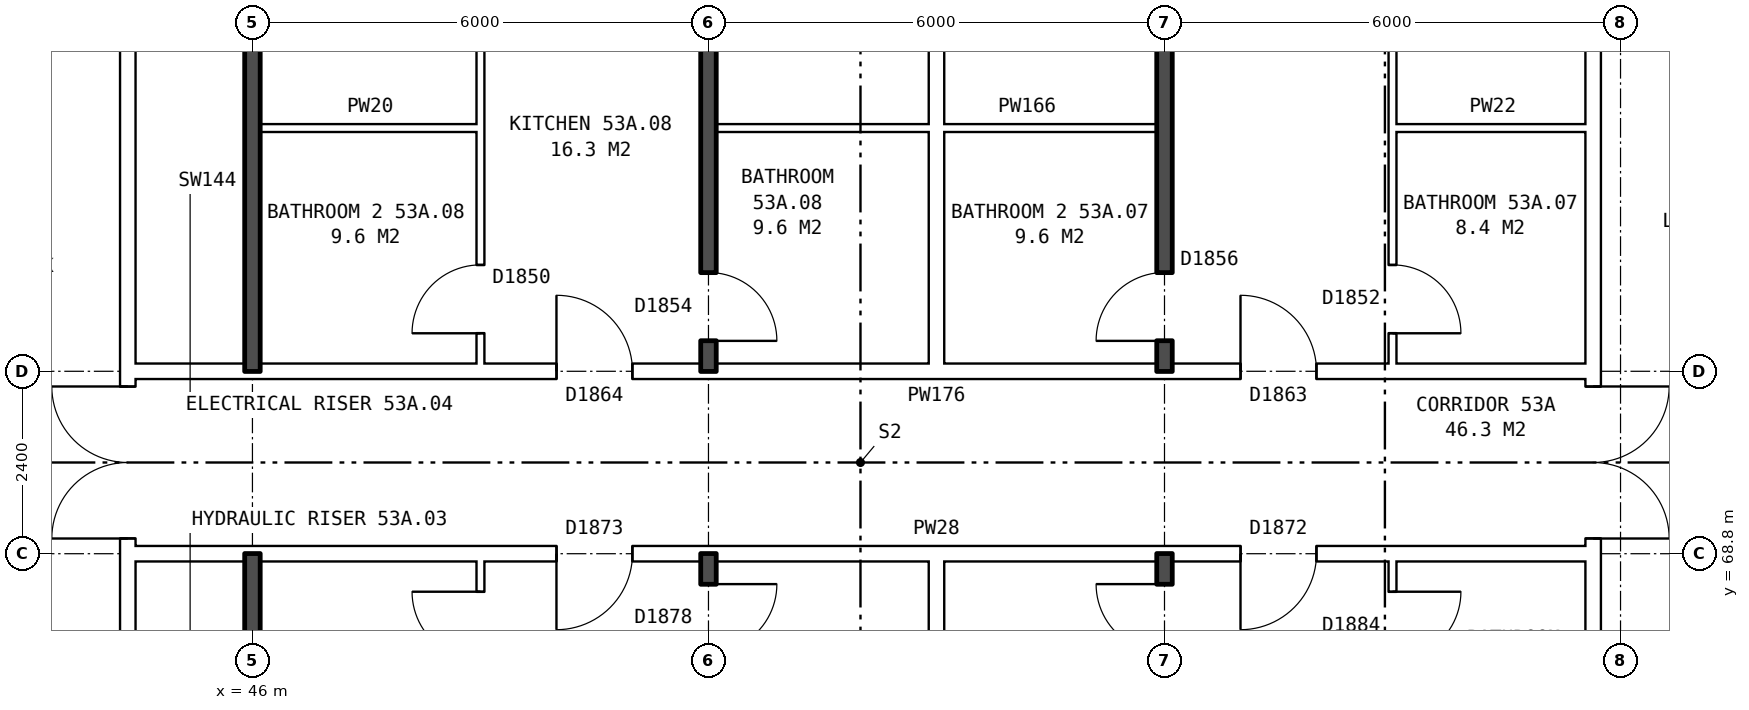
"""IFC4 building model, lengths in metres.
Left out: names, types, materials, properties, quantities, classifications, styles, units other than length and angle.
Written with IfcOpenShell. Run it as: python <this file> out.ifc"""

import sys

from ifc_helpers import new_model, si_unit, direction, frame, frame_2d, origin, place, context, subcontext, project, spatial, rectangle, extrude, element, fill, save


model = new_model("IFC4")
c1 = context("Model", 3, precision=1e-05, world=origin(), true_north=direction((0.0, 1.0)))
c2 = subcontext(c1, "Body", "Model", "MODEL_VIEW")
j1 = project(units=[si_unit("LENGTHUNIT", "METRE"), si_unit("PLANEANGLEUNIT", "RADIAN")], contexts=[c1])
p1 = place(None, origin())
s1 = spatial("IfcSite", under=j1, at=p1, CompositionType="ELEMENT")
p2 = place(p1, origin())
s2 = spatial("IfcBuilding", under=s1, at=p2, CompositionType="ELEMENT")
p3 = place(p2, frame((0.0, 0.0, 188.2)))
s3 = spatial("IfcBuildingStorey", under=s2, at=p3, CompositionType="ELEMENT", Elevation=188.2)
p4 = place(p3, frame((63.64, 63.9, 0.0), z_axis=(0.0, 0.0, 1.0), x_axis=(0.0, 1.0, 0.0)))
e1 = element("IfcWall", 1, at=p4, inside=s3, PredefinedType="PARTITIONING", context=c2, shape_type="SweptSolid", body=[
    extrude(rectangle(XDim=12.2, YDim=0.2, at=frame_2d((6.1, 0.0))), origin(), (0.0, 0.0, 1.0), 2.85),
])
p5 = place(p4, frame((5.1, 0.0, 0.0)))
e2 = element("IfcOpeningElement", 2, at=p5, cuts=e1, PredefinedType="OPENING", context=c2, shape_type="SweptSolid", body=[
    extrude(rectangle(XDim=2.0, YDim=2.1, at=frame_2d((1.0, 1.05))), frame((0.0, 0.11, 0.0), z_axis=(0.0, -1.0, 0.0), x_axis=(1.0, 0.0, 0.0)), (0.0, 0.0, 1.0), 0.22),
])
p6 = place(p3, frame((44.36, 63.9, 0.0), z_axis=(0.0, 0.0, 1.0), x_axis=(0.0, 1.0, 0.0)))
e3 = element("IfcWall", 3, at=p6, inside=s3, PredefinedType="PARTITIONING", context=c2, shape_type="SweptSolid", body=[
    extrude(rectangle(XDim=12.2, YDim=0.2, at=frame_2d((6.1, 0.0))), origin(), (0.0, 0.0, 1.0), 2.85),
])
p7 = place(p6, frame((5.1, 0.0, 0.0)))
e4 = element("IfcOpeningElement", 4, at=p7, cuts=e3, PredefinedType="OPENING", context=c2, shape_type="SweptSolid", body=[
    extrude(rectangle(XDim=2.0, YDim=2.1, at=frame_2d((1.0, 1.05))), frame((0.0, 0.11, 0.0), z_axis=(0.0, -1.0, 0.0), x_axis=(1.0, 0.0, 0.0)), (0.0, 0.0, 1.0), 0.22),
])
p8 = place(p3, frame((44.36, 68.8, 0.0), z_axis=(0.0, 0.0, 1.0), x_axis=(1.0, 0.0, 0.0)))
e5 = element("IfcWall", 5, at=p8, inside=s3, PredefinedType="PARTITIONING", context=c2, shape_type="SweptSolid", body=[
    extrude(rectangle(XDim=19.28, YDim=0.2, at=frame_2d((9.64, 0.0))), origin(), (0.0, 0.0, 1.0), 2.85),
])
p9 = place(p8, frame((14.64, 0.0, 0.0)))
e6 = element("IfcOpeningElement", 6, at=p9, cuts=e5, PredefinedType="OPENING", context=c2, shape_type="SweptSolid", body=[
    extrude(rectangle(XDim=1.0, YDim=2.1, at=frame_2d((0.5, 1.05))), frame((0.0, 0.11, 0.0), z_axis=(0.0, -1.0, 0.0), x_axis=(1.0, 0.0, 0.0)), (0.0, 0.0, 1.0), 0.22),
])
p10 = place(p8, frame((5.64, 0.0, 0.0)))
e7 = element("IfcOpeningElement", 7, at=p10, cuts=e5, PredefinedType="OPENING", context=c2, shape_type="SweptSolid", body=[
    extrude(rectangle(XDim=1.0, YDim=2.1, at=frame_2d((0.5, 1.05))), frame((0.0, 0.11, 0.0), z_axis=(0.0, -1.0, 0.0), x_axis=(1.0, 0.0, 0.0)), (0.0, 0.0, 1.0), 0.22),
])
p11 = place(p3, frame((44.36, 71.2, 0.0), z_axis=(0.0, 0.0, 1.0), x_axis=(1.0, 0.0, 0.0)))
e8 = element("IfcWall", 8, at=p11, inside=s3, PredefinedType="PARTITIONING", context=c2, shape_type="SweptSolid", body=[
    extrude(rectangle(XDim=19.28, YDim=0.2, at=frame_2d((9.64, 0.0))), origin(), (0.0, 0.0, 1.0), 2.85),
])
p12 = place(p11, frame((14.64, 0.0, 0.0)))
e9 = element("IfcOpeningElement", 9, at=p12, cuts=e8, PredefinedType="OPENING", context=c2, shape_type="SweptSolid", body=[
    extrude(rectangle(XDim=1.0, YDim=2.1, at=frame_2d((0.5, 1.05))), frame((0.0, 0.11, 0.0), z_axis=(0.0, -1.0, 0.0), x_axis=(1.0, 0.0, 0.0)), (0.0, 0.0, 1.0), 0.22),
])
p13 = place(p11, frame((5.64, 0.0, 0.0)))
e10 = element("IfcOpeningElement", 10, at=p13, cuts=e8, PredefinedType="OPENING", context=c2, shape_type="SweptSolid", body=[
    extrude(rectangle(XDim=1.0, YDim=2.1, at=frame_2d((0.5, 1.05))), frame((0.0, 0.11, 0.0), z_axis=(0.0, -1.0, 0.0), x_axis=(1.0, 0.0, 0.0)), (0.0, 0.0, 1.0), 0.22),
])
p14 = place(p3, frame((46.1, 74.4, 0.0), z_axis=(0.0, 0.0, 1.0), x_axis=(1.0, 0.0, 0.0)))
e11 = element("IfcWall", 11, at=p14, inside=s3, PredefinedType="PARTITIONING", context=c2, shape_type="SweptSolid", body=[
    extrude(rectangle(XDim=2.9, YDim=0.1, at=frame_2d((1.45, 0.0))), origin(), (0.0, 0.0, 1.0), 2.85),
])
p15 = place(p3, frame((52.1, 74.4, 0.0), z_axis=(0.0, 0.0, 1.0), x_axis=(1.0, 0.0, 0.0)))
e12 = element("IfcWall", 12, at=p15, inside=s3, PredefinedType="PARTITIONING", context=c2, shape_type="SweptSolid", body=[
    extrude(rectangle(XDim=5.8, YDim=0.1, at=frame_2d((2.9, 0.0))), origin(), (0.0, 0.0, 1.0), 2.85),
])
p16 = place(p3, frame((61.0, 74.4, 0.0), z_axis=(0.0, 0.0, 1.0), x_axis=(1.0, 0.0, 0.0)))
e13 = element("IfcWall", 13, at=p16, inside=s3, PredefinedType="PARTITIONING", context=c2, shape_type="SweptSolid", body=[
    extrude(rectangle(XDim=2.64, YDim=0.1, at=frame_2d((1.32, 0.0))), origin(), (0.0, 0.0, 1.0), 2.85),
])
for number, where, z_axis, x_axis in (
    (14, (46.0, 63.8, 0.0), (0.0, 0.0, 1.0), (0.0, 1.0, 0.0)),
    (15, (46.0, 71.2, 0.0), (0.0, 0.0, 1.0), (0.0, 1.0, 0.0)),
):
    element("IfcWall", number, at=place(p3, frame(where, z_axis=z_axis, x_axis=x_axis)), inside=s3, PredefinedType="SOLIDWALL", context=c2, shape_type="SweptSolid", body=[
        extrude(rectangle(XDim=5.0, YDim=0.2, at=frame_2d((2.5, 0.0))), origin(), (0.0, 0.0, 1.0), 2.85),
    ])
p17 = place(p3, frame((49.0, 54.36, 0.0), z_axis=(0.0, 0.0, 1.0), x_axis=(0.0, 1.0, 0.0)))
e16 = element("IfcWall", 16, at=p17, inside=s3, PredefinedType="PARTITIONING", context=c2, shape_type="SweptSolid", body=[
    extrude(rectangle(XDim=14.34, YDim=0.1, at=frame_2d((7.17, 0.0))), origin(), (0.0, 0.0, 1.0), 2.85),
])
p18 = place(p17, frame((5.5, 0.0, 0.0)))
e17 = element("IfcOpeningElement", 17, at=p18, cuts=e16, PredefinedType="OPENING", context=c2, shape_type="SweptSolid", body=[
    extrude(rectangle(XDim=0.9, YDim=2.1, at=frame_2d((0.45, 1.05))), frame((0.0, 0.06, 0.0), z_axis=(0.0, -1.0, 0.0), x_axis=(1.0, 0.0, 0.0)), (0.0, 0.0, 1.0), 0.12),
])
p19 = place(p17, frame((13.04, 0.0, 0.0)))
e18 = element("IfcOpeningElement", 18, at=p19, cuts=e16, PredefinedType="OPENING", context=c2, shape_type="SweptSolid", body=[
    extrude(rectangle(XDim=0.9, YDim=2.1, at=frame_2d((0.45, 1.05))), frame((0.0, 0.06, 0.0), z_axis=(0.0, -1.0, 0.0), x_axis=(1.0, 0.0, 0.0)), (0.0, 0.0, 1.0), 0.12),
])
p20 = place(p3, frame((49.0, 71.3, 0.0), z_axis=(0.0, 0.0, 1.0), x_axis=(0.0, 1.0, 0.0)))
e19 = element("IfcWall", 19, at=p20, inside=s3, PredefinedType="PARTITIONING", context=c2, shape_type="SweptSolid", body=[
    extrude(rectangle(XDim=14.34, YDim=0.1, at=frame_2d((7.17, 0.0))), origin(), (0.0, 0.0, 1.0), 2.85),
])
p21 = place(p20, frame((5.74, 0.0, 0.0)))
e20 = element("IfcOpeningElement", 20, at=p21, cuts=e19, PredefinedType="OPENING", context=c2, shape_type="SweptSolid", body=[
    extrude(rectangle(XDim=0.9, YDim=2.1, at=frame_2d((0.45, 1.05))), frame((0.0, 0.06, 0.0), z_axis=(0.0, -1.0, 0.0), x_axis=(1.0, 0.0, 0.0)), (0.0, 0.0, 1.0), 0.12),
])
p22 = place(p20, frame((0.4, 0.0, 0.0)))
e21 = element("IfcOpeningElement", 21, at=p22, cuts=e19, PredefinedType="OPENING", context=c2, shape_type="SweptSolid", body=[
    extrude(rectangle(XDim=0.9, YDim=2.1, at=frame_2d((0.45, 1.05))), frame((0.0, 0.06, 0.0), z_axis=(0.0, -1.0, 0.0), x_axis=(1.0, 0.0, 0.0)), (0.0, 0.0, 1.0), 0.12),
])
p23 = place(p3, frame((52.0, 54.36, 0.0), z_axis=(0.0, 0.0, 1.0), x_axis=(0.0, 1.0, 0.0)))
e22 = element("IfcWall", 22, at=p23, inside=s3, PredefinedType="SOLIDWALL", context=c2, shape_type="SweptSolid", body=[
    extrude(rectangle(XDim=14.44, YDim=0.2, at=frame_2d((7.22, 0.0))), origin(), (0.0, 0.0, 1.0), 2.85),
])
p24 = place(p23, frame((5.5, 0.0, 0.0)))
e23 = element("IfcOpeningElement", 23, at=p24, cuts=e22, PredefinedType="OPENING", context=c2, shape_type="SweptSolid", body=[
    extrude(rectangle(XDim=0.9, YDim=2.1, at=frame_2d((0.45, 1.05))), frame((0.0, 0.11, 0.0), z_axis=(0.0, -1.0, 0.0), x_axis=(1.0, 0.0, 0.0)), (0.0, 0.0, 1.0), 0.22),
])
p25 = place(p23, frame((13.14, 0.0, 0.0)))
e24 = element("IfcOpeningElement", 24, at=p25, cuts=e22, PredefinedType="OPENING", context=c2, shape_type="SweptSolid", body=[
    extrude(rectangle(XDim=0.9, YDim=2.1, at=frame_2d((0.45, 1.05))), frame((0.0, 0.11, 0.0), z_axis=(0.0, -1.0, 0.0), x_axis=(1.0, 0.0, 0.0)), (0.0, 0.0, 1.0), 0.22),
])
p26 = place(p3, frame((52.0, 71.2, 0.0), z_axis=(0.0, 0.0, 1.0), x_axis=(0.0, 1.0, 0.0)))
e25 = element("IfcWall", 25, at=p26, inside=s3, PredefinedType="SOLIDWALL", context=c2, shape_type="SweptSolid", body=[
    extrude(rectangle(XDim=14.44, YDim=0.2, at=frame_2d((7.22, 0.0))), origin(), (0.0, 0.0, 1.0), 2.85),
])
p27 = place(p26, frame((5.84, 0.0, 0.0)))
e26 = element("IfcOpeningElement", 26, at=p27, cuts=e25, PredefinedType="OPENING", context=c2, shape_type="SweptSolid", body=[
    extrude(rectangle(XDim=0.9, YDim=2.1, at=frame_2d((0.45, 1.05))), frame((0.0, 0.11, 0.0), z_axis=(0.0, -1.0, 0.0), x_axis=(1.0, 0.0, 0.0)), (0.0, 0.0, 1.0), 0.22),
])
p28 = place(p26, frame((0.4, 0.0, 0.0)))
e27 = element("IfcOpeningElement", 27, at=p28, cuts=e25, PredefinedType="OPENING", context=c2, shape_type="SweptSolid", body=[
    extrude(rectangle(XDim=0.9, YDim=2.1, at=frame_2d((0.45, 1.05))), frame((0.0, 0.11, 0.0), z_axis=(0.0, -1.0, 0.0), x_axis=(1.0, 0.0, 0.0)), (0.0, 0.0, 1.0), 0.22),
])
for number, where, z_axis, x_axis in (
    (28, (55.0, 54.36, 0.0), (0.0, 0.0, 1.0), (0.0, 1.0, 0.0)),
    (29, (55.0, 71.3, 0.0), (0.0, 0.0, 1.0), (0.0, 1.0, 0.0)),
):
    element("IfcWall", number, at=place(p3, frame(where, z_axis=z_axis, x_axis=x_axis)), inside=s3, PredefinedType="PARTITIONING", context=c2, shape_type="SweptSolid", body=[
        extrude(rectangle(XDim=14.34, YDim=0.2, at=frame_2d((7.17, 0.0))), origin(), (0.0, 0.0, 1.0), 2.85),
    ])
p29 = place(p3, frame((58.0, 54.36, 0.0), z_axis=(0.0, 0.0, 1.0), x_axis=(0.0, 1.0, 0.0)))
e30 = element("IfcWall", 30, at=p29, inside=s3, PredefinedType="SOLIDWALL", context=c2, shape_type="SweptSolid", body=[
    extrude(rectangle(XDim=14.44, YDim=0.2, at=frame_2d((7.22, 0.0))), origin(), (0.0, 0.0, 1.0), 2.85),
])
p30 = place(p29, frame((5.5, 0.0, 0.0)))
e31 = element("IfcOpeningElement", 31, at=p30, cuts=e30, PredefinedType="OPENING", context=c2, shape_type="SweptSolid", body=[
    extrude(rectangle(XDim=0.9, YDim=2.1, at=frame_2d((0.45, 1.05))), frame((0.0, 0.11, 0.0), z_axis=(0.0, -1.0, 0.0), x_axis=(1.0, 0.0, 0.0)), (0.0, 0.0, 1.0), 0.22),
])
p31 = place(p29, frame((13.14, 0.0, 0.0)))
e32 = element("IfcOpeningElement", 32, at=p31, cuts=e30, PredefinedType="OPENING", context=c2, shape_type="SweptSolid", body=[
    extrude(rectangle(XDim=0.9, YDim=2.1, at=frame_2d((0.45, 1.05))), frame((0.0, 0.11, 0.0), z_axis=(0.0, -1.0, 0.0), x_axis=(1.0, 0.0, 0.0)), (0.0, 0.0, 1.0), 0.22),
])
p32 = place(p3, frame((58.0, 71.2, 0.0), z_axis=(0.0, 0.0, 1.0), x_axis=(0.0, 1.0, 0.0)))
e33 = element("IfcWall", 33, at=p32, inside=s3, PredefinedType="SOLIDWALL", context=c2, shape_type="SweptSolid", body=[
    extrude(rectangle(XDim=14.44, YDim=0.2, at=frame_2d((7.22, 0.0))), origin(), (0.0, 0.0, 1.0), 2.85),
])
p33 = place(p32, frame((9.34, 0.0, 0.0)))
e34 = element("IfcOpeningElement", 34, at=p33, cuts=e33, PredefinedType="OPENING", context=c2, shape_type="SweptSolid", body=[
    extrude(rectangle(XDim=0.9, YDim=2.1, at=frame_2d((0.45, 1.05))), frame((0.0, 0.11, 0.0), z_axis=(0.0, -1.0, 0.0), x_axis=(1.0, 0.0, 0.0)), (0.0, 0.0, 1.0), 0.22),
])
p34 = place(p32, frame((0.4, 0.0, 0.0)))
e35 = element("IfcOpeningElement", 35, at=p34, cuts=e33, PredefinedType="OPENING", context=c2, shape_type="SweptSolid", body=[
    extrude(rectangle(XDim=0.9, YDim=2.1, at=frame_2d((0.45, 1.05))), frame((0.0, 0.11, 0.0), z_axis=(0.0, -1.0, 0.0), x_axis=(1.0, 0.0, 0.0)), (0.0, 0.0, 1.0), 0.22),
])
p35 = place(p3, frame((61.0, 54.36, 0.0), z_axis=(0.0, 0.0, 1.0), x_axis=(0.0, 1.0, 0.0)))
e36 = element("IfcWall", 36, at=p35, inside=s3, PredefinedType="PARTITIONING", context=c2, shape_type="SweptSolid", body=[
    extrude(rectangle(XDim=14.34, YDim=0.1, at=frame_2d((7.17, 0.0))), origin(), (0.0, 0.0, 1.0), 2.85),
])
p36 = place(p35, frame((5.5, 0.0, 0.0)))
e37 = element("IfcOpeningElement", 37, at=p36, cuts=e36, PredefinedType="OPENING", context=c2, shape_type="SweptSolid", body=[
    extrude(rectangle(XDim=0.9, YDim=2.1, at=frame_2d((0.45, 1.05))), frame((0.0, 0.06, 0.0), z_axis=(0.0, -1.0, 0.0), x_axis=(1.0, 0.0, 0.0)), (0.0, 0.0, 1.0), 0.12),
])
p37 = place(p35, frame((13.04, 0.0, 0.0)))
e38 = element("IfcOpeningElement", 38, at=p37, cuts=e36, PredefinedType="OPENING", context=c2, shape_type="SweptSolid", body=[
    extrude(rectangle(XDim=0.9, YDim=2.1, at=frame_2d((0.45, 1.05))), frame((0.0, 0.06, 0.0), z_axis=(0.0, -1.0, 0.0), x_axis=(1.0, 0.0, 0.0)), (0.0, 0.0, 1.0), 0.12),
])
p38 = place(p3, frame((61.0, 71.3, 0.0), z_axis=(0.0, 0.0, 1.0), x_axis=(0.0, 1.0, 0.0)))
e39 = element("IfcWall", 39, at=p38, inside=s3, PredefinedType="PARTITIONING", context=c2, shape_type="SweptSolid", body=[
    extrude(rectangle(XDim=14.34, YDim=0.1, at=frame_2d((7.17, 0.0))), origin(), (0.0, 0.0, 1.0), 2.85),
])
p39 = place(p38, frame((9.24, 0.0, 0.0)))
e40 = element("IfcOpeningElement", 40, at=p39, cuts=e39, PredefinedType="OPENING", context=c2, shape_type="SweptSolid", body=[
    extrude(rectangle(XDim=0.9, YDim=2.1, at=frame_2d((0.45, 1.05))), frame((0.0, 0.06, 0.0), z_axis=(0.0, -1.0, 0.0), x_axis=(1.0, 0.0, 0.0)), (0.0, 0.0, 1.0), 0.12),
])
p40 = place(p38, frame((0.4, 0.0, 0.0)))
e41 = element("IfcOpeningElement", 41, at=p40, cuts=e39, PredefinedType="OPENING", context=c2, shape_type="SweptSolid", body=[
    extrude(rectangle(XDim=0.9, YDim=2.1, at=frame_2d((0.45, 1.05))), frame((0.0, 0.06, 0.0), z_axis=(0.0, -1.0, 0.0), x_axis=(1.0, 0.0, 0.0)), (0.0, 0.0, 1.0), 0.12),
])
p41 = place(p5, frame((2.0, 0.0, 0.0), z_axis=(0.0, 0.0, 1.0), x_axis=(-1.0, 0.0, 0.0)))
e42 = element("IfcDoor", 42, at=p41, inside=s3, OperationType="DOUBLE_DOOR_SINGLE_SWING", PredefinedType="DOOR", context=c2, shape_type="SweptSolid", body=[
    extrude(rectangle(XDim=2.0, YDim=2.1, at=frame_2d((1.0, 1.05))), frame((0.0, 0.025, 0.0), z_axis=(0.0, -1.0, 0.0), x_axis=(1.0, 0.0, 0.0)), (0.0, 0.0, 1.0), 0.05),
])
fill(e2, e42)
p42 = place(p7, origin())
e43 = element("IfcDoor", 43, at=p42, inside=s3, OperationType="DOUBLE_DOOR_SINGLE_SWING", PredefinedType="DOOR", context=c2, shape_type="SweptSolid", body=[
    extrude(rectangle(XDim=2.0, YDim=2.1, at=frame_2d((1.0, 1.05))), frame((0.0, 0.025, 0.0), z_axis=(0.0, -1.0, 0.0), x_axis=(1.0, 0.0, 0.0)), (0.0, 0.0, 1.0), 0.05),
])
fill(e4, e43)
p43 = place(p9, frame((1.0, 0.0, 0.0), z_axis=(0.0, 0.0, 1.0), x_axis=(-1.0, 0.0, 0.0)))
e44 = element("IfcDoor", 44, at=p43, inside=s3, OperationType="SINGLE_SWING_RIGHT", PredefinedType="DOOR", context=c2, shape_type="SweptSolid", body=[
    extrude(rectangle(XDim=1.0, YDim=2.1, at=frame_2d((0.5, 1.05))), frame((0.0, 0.025, 0.0), z_axis=(0.0, -1.0, 0.0), x_axis=(1.0, 0.0, 0.0)), (0.0, 0.0, 1.0), 0.05),
])
fill(e6, e44)
p44 = place(p37, frame((0.9, 0.0, 0.0), z_axis=(0.0, 0.0, 1.0), x_axis=(-1.0, 0.0, 0.0)))
e45 = element("IfcDoor", 45, at=p44, inside=s3, OperationType="SINGLE_SWING_LEFT", PredefinedType="DOOR", context=c2, shape_type="SweptSolid", body=[
    extrude(rectangle(XDim=0.9, YDim=2.1, at=frame_2d((0.45, 1.05))), frame((0.0, 0.025, 0.0), z_axis=(0.0, -1.0, 0.0), x_axis=(1.0, 0.0, 0.0)), (0.0, 0.0, 1.0), 0.05),
])
fill(e38, e45)
p45 = place(p31, origin())
e46 = element("IfcDoor", 46, at=p45, inside=s3, OperationType="SINGLE_SWING_RIGHT", PredefinedType="DOOR", context=c2, shape_type="SweptSolid", body=[
    extrude(rectangle(XDim=0.9, YDim=2.1, at=frame_2d((0.45, 1.05))), frame((0.0, 0.025, 0.0), z_axis=(0.0, -1.0, 0.0), x_axis=(1.0, 0.0, 0.0)), (0.0, 0.0, 1.0), 0.05),
])
fill(e32, e46)
p46 = place(p10, frame((1.0, 0.0, 0.0), z_axis=(0.0, 0.0, 1.0), x_axis=(-1.0, 0.0, 0.0)))
e47 = element("IfcDoor", 47, at=p46, inside=s3, OperationType="SINGLE_SWING_RIGHT", PredefinedType="DOOR", context=c2, shape_type="SweptSolid", body=[
    extrude(rectangle(XDim=1.0, YDim=2.1, at=frame_2d((0.5, 1.05))), frame((0.0, 0.025, 0.0), z_axis=(0.0, -1.0, 0.0), x_axis=(1.0, 0.0, 0.0)), (0.0, 0.0, 1.0), 0.05),
])
fill(e7, e47)
p47 = place(p25, frame((0.9, 0.0, 0.0), z_axis=(0.0, 0.0, 1.0), x_axis=(-1.0, 0.0, 0.0)))
e48 = element("IfcDoor", 48, at=p47, inside=s3, OperationType="SINGLE_SWING_LEFT", PredefinedType="DOOR", context=c2, shape_type="SweptSolid", body=[
    extrude(rectangle(XDim=0.9, YDim=2.1, at=frame_2d((0.45, 1.05))), frame((0.0, 0.025, 0.0), z_axis=(0.0, -1.0, 0.0), x_axis=(1.0, 0.0, 0.0)), (0.0, 0.0, 1.0), 0.05),
])
fill(e24, e48)
p48 = place(p19, origin())
e49 = element("IfcDoor", 49, at=p48, inside=s3, OperationType="SINGLE_SWING_RIGHT", PredefinedType="DOOR", context=c2, shape_type="SweptSolid", body=[
    extrude(rectangle(XDim=0.9, YDim=2.1, at=frame_2d((0.45, 1.05))), frame((0.0, 0.025, 0.0), z_axis=(0.0, -1.0, 0.0), x_axis=(1.0, 0.0, 0.0)), (0.0, 0.0, 1.0), 0.05),
])
fill(e18, e49)
p49 = place(p12, origin())
e50 = element("IfcDoor", 50, at=p49, inside=s3, OperationType="SINGLE_SWING_LEFT", PredefinedType="DOOR", context=c2, shape_type="SweptSolid", body=[
    extrude(rectangle(XDim=1.0, YDim=2.1, at=frame_2d((0.5, 1.05))), frame((0.0, 0.025, 0.0), z_axis=(0.0, -1.0, 0.0), x_axis=(1.0, 0.0, 0.0)), (0.0, 0.0, 1.0), 0.05),
])
fill(e9, e50)
p50 = place(p40, frame((0.9, 0.0, 0.0), z_axis=(0.0, 0.0, 1.0), x_axis=(-1.0, 0.0, 0.0)))
e51 = element("IfcDoor", 51, at=p50, inside=s3, OperationType="SINGLE_SWING_RIGHT", PredefinedType="DOOR", context=c2, shape_type="SweptSolid", body=[
    extrude(rectangle(XDim=0.9, YDim=2.1, at=frame_2d((0.45, 1.05))), frame((0.0, 0.025, 0.0), z_axis=(0.0, -1.0, 0.0), x_axis=(1.0, 0.0, 0.0)), (0.0, 0.0, 1.0), 0.05),
])
fill(e41, e51)
p51 = place(p34, origin())
e52 = element("IfcDoor", 52, at=p51, inside=s3, OperationType="SINGLE_SWING_LEFT", PredefinedType="DOOR", context=c2, shape_type="SweptSolid", body=[
    extrude(rectangle(XDim=0.9, YDim=2.1, at=frame_2d((0.45, 1.05))), frame((0.0, 0.025, 0.0), z_axis=(0.0, -1.0, 0.0), x_axis=(1.0, 0.0, 0.0)), (0.0, 0.0, 1.0), 0.05),
])
fill(e35, e52)
p52 = place(p13, origin())
e53 = element("IfcDoor", 53, at=p52, inside=s3, OperationType="SINGLE_SWING_LEFT", PredefinedType="DOOR", context=c2, shape_type="SweptSolid", body=[
    extrude(rectangle(XDim=1.0, YDim=2.1, at=frame_2d((0.5, 1.05))), frame((0.0, 0.025, 0.0), z_axis=(0.0, -1.0, 0.0), x_axis=(1.0, 0.0, 0.0)), (0.0, 0.0, 1.0), 0.05),
])
fill(e10, e53)
p53 = place(p28, frame((0.9, 0.0, 0.0), z_axis=(0.0, 0.0, 1.0), x_axis=(-1.0, 0.0, 0.0)))
e54 = element("IfcDoor", 54, at=p53, inside=s3, OperationType="SINGLE_SWING_RIGHT", PredefinedType="DOOR", context=c2, shape_type="SweptSolid", body=[
    extrude(rectangle(XDim=0.9, YDim=2.1, at=frame_2d((0.45, 1.05))), frame((0.0, 0.025, 0.0), z_axis=(0.0, -1.0, 0.0), x_axis=(1.0, 0.0, 0.0)), (0.0, 0.0, 1.0), 0.05),
])
fill(e27, e54)
p54 = place(p22, origin())
e55 = element("IfcDoor", 55, at=p54, inside=s3, OperationType="SINGLE_SWING_LEFT", PredefinedType="DOOR", context=c2, shape_type="SweptSolid", body=[
    extrude(rectangle(XDim=0.9, YDim=2.1, at=frame_2d((0.45, 1.05))), frame((0.0, 0.025, 0.0), z_axis=(0.0, -1.0, 0.0), x_axis=(1.0, 0.0, 0.0)), (0.0, 0.0, 1.0), 0.05),
])
fill(e21, e55)
save(model, sys.argv[1])
